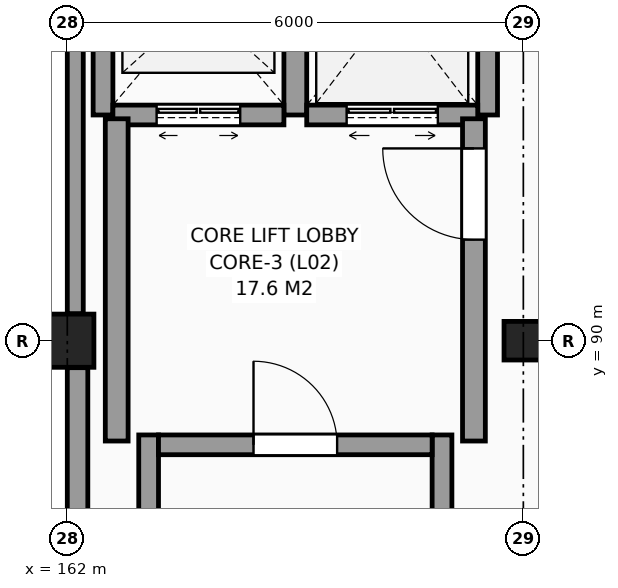
"""IFC4 building model, lengths in metres.
Left out: names, types, materials, properties, quantities, classifications, styles, units other than length and angle.
Written with IfcOpenShell. Run it as: python <this file> out.ifc"""

import sys

from ifc_helpers import new_model, si_unit, direction, frame, frame_2d, origin, origin_2d, place, context, subcontext, project, spatial, rectangle, circle, hollow_circle, extrude, element, fill, save


model = new_model("IFC4")
c1 = context("Model", 3, precision=1e-05, world=origin(), true_north=direction((0.0, 1.0)))
c2 = subcontext(c1, "Body", "Model", "MODEL_VIEW")
j1 = project(units=[si_unit("LENGTHUNIT", "METRE"), si_unit("PLANEANGLEUNIT", "RADIAN")], contexts=[c1])
p1 = place(None, origin())
s1 = spatial("IfcSite", under=j1, at=p1, CompositionType="ELEMENT")
p2 = place(p1, origin())
s2 = spatial("IfcBuilding", under=s1, at=p2, CompositionType="ELEMENT")
p3 = place(p2, frame((0.0, 0.0, 10.5)))
s3 = spatial("IfcBuildingStorey", under=s2, at=p3, CompositionType="ELEMENT", Elevation=10.5)
p4 = place(p3, frame((162.0, 90.0, 0.0), z_axis=(0.0, 0.0, 1.0), x_axis=(1.0, 0.0, 0.0)))
e1 = element("IfcColumn", 1, at=p4, inside=s3, PredefinedType="COLUMN", context=c2, shape_type="SweptSolid", body=[
    extrude(circle(Radius=0.35, at=origin_2d()), origin(), (0.0, 0.0, 1.0), 4.5),
])
p5 = place(p3, frame((168.0, 90.0, 0.0), z_axis=(0.0, 0.0, 1.0), x_axis=(1.0, 0.0, 0.0)))
e2 = element("IfcColumn", 2, at=p5, inside=s3, PredefinedType="COLUMN", context=c2, shape_type="SweptSolid", body=[
    extrude(hollow_circle(Radius=0.254, WallThickness=0.025, at=origin_2d()), origin(), (0.0, 0.0, 1.0), 4.5),
])
p6 = place(p3, frame((162.105, 95.741, 0.0), z_axis=(0.0, 0.0, 1.0), x_axis=(0.0, -1.0, 0.0)))
e3 = element("IfcWall", 3, at=p6, inside=s3, PredefinedType="SOLIDWALL", context=c2, shape_type="SweptSolid", body=[
    extrude(rectangle(XDim=5.386, YDim=0.21, at=frame_2d((2.693, 0.0))), origin(), (0.0, 0.0, 1.0), 3.49),
])
p7 = place(p3, frame((162.135, 89.645, 0.0), z_axis=(0.0, 0.0, 1.0), x_axis=(0.0, -1.0, 0.0)))
e4 = element("IfcWall", 4, at=p7, inside=s3, PredefinedType="SOLIDWALL", context=c2, shape_type="SweptSolid", body=[
    extrude(rectangle(XDim=5.315, YDim=0.27, at=frame_2d((2.657, 0.0))), origin(), (0.0, 0.0, 1.0), 3.49),
])
for number, where, z_axis, x_axis in (
    (5, (163.07, 78.04, 0.0), (0.0, 0.0, 1.0), (0.0, 1.0, 0.0)),
    (6, (166.93, 78.04, 0.0), (0.0, 0.0, 1.0), (0.0, 1.0, 0.0)),
):
    element("IfcWall", number, at=place(p3, frame(where, z_axis=z_axis, x_axis=x_axis)), inside=s3, PredefinedType="SHEAR", context=c2, shape_type="SweptSolid", body=[
        extrude(rectangle(XDim=10.72, YDim=0.26, at=frame_2d((5.36, 0.0))), origin(), (0.0, 0.0, 1.0), 4.5),
    ])
p8 = place(p3, frame((163.2, 88.63, 0.0), z_axis=(0.0, 0.0, 1.0), x_axis=(1.0, 0.0, 0.0)))
e7 = element("IfcWall", 7, at=p8, inside=s3, PredefinedType="SHEAR", context=c2, shape_type="SweptSolid", body=[
    extrude(rectangle(XDim=3.6, YDim=0.26, at=frame_2d((1.8, 0.0))), origin(), (0.0, 0.0, 1.0), 4.5),
])
p9 = place(p8, frame((1.25, 0.0, 0.0)))
e8 = element("IfcOpeningElement", 8, at=p9, cuts=e7, PredefinedType="OPENING", context=c2, shape_type="SweptSolid", body=[
    extrude(rectangle(XDim=1.1, YDim=2.15, at=frame_2d((0.55, 1.075))), frame((0.0, 0.14, 0.0), z_axis=(0.0, -1.0, 0.0), x_axis=(1.0, 0.0, 0.0)), (0.0, 0.0, 1.0), 0.28),
])
p10 = place(p3, frame((162.47, 92.97, 0.0), z_axis=(0.0, 0.0, 1.0), x_axis=(0.0, 1.0, 0.0)))
e9 = element("IfcWall", 9, at=p10, inside=s3, PredefinedType="SHEAR", context=c2, shape_type="SweptSolid", body=[
    extrude(rectangle(XDim=2.91, YDim=0.26, at=frame_2d((1.455, 0.0))), origin(), (0.0, 0.0, 1.0), 4.5),
])
p11 = place(p3, frame((165.0, 92.97, 0.0), z_axis=(0.0, 0.0, 1.0), x_axis=(0.0, 1.0, 0.0)))
e10 = element("IfcWall", 10, at=p11, inside=s3, PredefinedType="SHEAR", context=c2, shape_type="SweptSolid", body=[
    extrude(rectangle(XDim=2.91, YDim=0.3, at=frame_2d((1.455, 0.0))), origin(), (0.0, 0.0, 1.0), 4.5),
])
p12 = place(p3, frame((162.6, 92.97, 0.0), z_axis=(0.0, 0.0, 1.0), x_axis=(1.0, 0.0, 0.0)))
e11 = element("IfcWall", 11, at=p12, inside=s3, PredefinedType="SHEAR", context=c2, shape_type="SweptSolid", body=[
    extrude(rectangle(XDim=2.25, YDim=0.26, at=frame_2d((1.125, 0.0))), origin(), (0.0, 0.0, 1.0), 4.5),
])
p13 = place(p12, frame((0.575, 0.0, 0.0)))
e12 = element("IfcOpeningElement", 12, at=p13, cuts=e11, PredefinedType="OPENING", context=c2, shape_type="SweptSolid", body=[
    extrude(rectangle(XDim=1.1, YDim=2.2, at=frame_2d((0.55, 1.1))), frame((0.0, 0.14, 0.0), z_axis=(0.0, -1.0, 0.0), x_axis=(1.0, 0.0, 0.0)), (0.0, 0.0, 1.0), 0.28),
])
p14 = place(p3, frame((167.53, 92.97, 0.0), z_axis=(0.0, 0.0, 1.0), x_axis=(0.0, 1.0, 0.0)))
e13 = element("IfcWall", 13, at=p14, inside=s3, PredefinedType="SHEAR", context=c2, shape_type="SweptSolid", body=[
    extrude(rectangle(XDim=2.91, YDim=0.26, at=frame_2d((1.455, 0.0))), origin(), (0.0, 0.0, 1.0), 4.5),
])
p15 = place(p3, frame((165.15, 92.97, 0.0), z_axis=(0.0, 0.0, 1.0), x_axis=(1.0, 0.0, 0.0)))
e14 = element("IfcWall", 14, at=p15, inside=s3, PredefinedType="SHEAR", context=c2, shape_type="SweptSolid", body=[
    extrude(rectangle(XDim=2.25, YDim=0.26, at=frame_2d((1.125, 0.0))), origin(), (0.0, 0.0, 1.0), 4.5),
])
p16 = place(p15, frame((0.525, 0.0, 0.0)))
e15 = element("IfcOpeningElement", 15, at=p16, cuts=e14, PredefinedType="OPENING", context=c2, shape_type="SweptSolid", body=[
    extrude(rectangle(XDim=1.2, YDim=2.25, at=frame_2d((0.6, 1.125))), frame((0.0, 0.14, 0.0), z_axis=(0.0, -1.0, 0.0), x_axis=(1.0, 0.0, 0.0)), (0.0, 0.0, 1.0), 0.28),
])
p17 = place(p3, frame((167.35, 88.68, 0.0), z_axis=(0.0, 0.0, 1.0), x_axis=(0.0, 1.0, 0.0)))
e16 = element("IfcWall", 16, at=p17, inside=s3, PredefinedType="SHEAR", context=c2, shape_type="SweptSolid", body=[
    extrude(rectangle(XDim=4.24, YDim=0.3, at=frame_2d((2.12, 0.0))), origin(), (0.0, 0.0, 1.0), 4.5),
])
p18 = place(p17, frame((2.65, 0.0, 0.0)))
e17 = element("IfcOpeningElement", 17, at=p18, cuts=e16, PredefinedType="OPENING", context=c2, shape_type="SweptSolid", body=[
    extrude(rectangle(XDim=1.2, YDim=2.2, at=frame_2d((0.6, 1.1))), frame((0.0, 0.16, 0.0), z_axis=(0.0, -1.0, 0.0), x_axis=(1.0, 0.0, 0.0)), (0.0, 0.0, 1.0), 0.32),
])
p19 = place(p3, frame((162.65, 88.68, 0.0), z_axis=(0.0, 0.0, 1.0), x_axis=(0.0, 1.0, 0.0)))
e18 = element("IfcWall", 18, at=p19, inside=s3, PredefinedType="SHEAR", context=c2, shape_type="SweptSolid", body=[
    extrude(rectangle(XDim=4.24, YDim=0.3, at=frame_2d((2.12, 0.0))), origin(), (0.0, 0.0, 1.0), 4.5),
])
p20 = place(p9, origin())
e19 = element("IfcDoor", 19, at=p20, inside=s3, OperationType="SINGLE_SWING_LEFT", PredefinedType="DOOR", context=c2, shape_type="SweptSolid", body=[
    extrude(rectangle(XDim=1.1, YDim=2.15, at=frame_2d((0.55, 1.075))), frame((0.0, 0.025, 0.0), z_axis=(0.0, -1.0, 0.0), x_axis=(1.0, 0.0, 0.0)), (0.0, 0.0, 1.0), 0.05),
])
fill(e8, e19)
p21 = place(p13, origin())
e20 = element("IfcDoor", 20, at=p21, inside=s3, OperationType="DOUBLE_DOOR_SLIDING", PredefinedType="DOOR", context=c2, shape_type="SweptSolid", body=[
    extrude(rectangle(XDim=1.1, YDim=2.2, at=frame_2d((0.55, 1.1))), frame((0.0, 0.025, 0.0), z_axis=(0.0, -1.0, 0.0), x_axis=(1.0, 0.0, 0.0)), (0.0, 0.0, 1.0), 0.05),
])
fill(e12, e20)
p22 = place(p16, origin())
e21 = element("IfcDoor", 21, at=p22, inside=s3, OperationType="DOUBLE_DOOR_SLIDING", PredefinedType="DOOR", context=c2, shape_type="SweptSolid", body=[
    extrude(rectangle(XDim=1.2, YDim=2.25, at=frame_2d((0.6, 1.125))), frame((0.0, 0.025, 0.0), z_axis=(0.0, -1.0, 0.0), x_axis=(1.0, 0.0, 0.0)), (0.0, 0.0, 1.0), 0.05),
])
fill(e15, e21)
p23 = place(p18, origin())
e22 = element("IfcDoor", 22, at=p23, inside=s3, OperationType="SINGLE_SWING_RIGHT", PredefinedType="DOOR", context=c2, shape_type="SweptSolid", body=[
    extrude(rectangle(XDim=1.2, YDim=2.2, at=frame_2d((0.6, 1.1))), frame((0.0, 0.025, 0.0), z_axis=(0.0, -1.0, 0.0), x_axis=(1.0, 0.0, 0.0)), (0.0, 0.0, 1.0), 0.05),
])
fill(e17, e22)
save(model, sys.argv[1])
